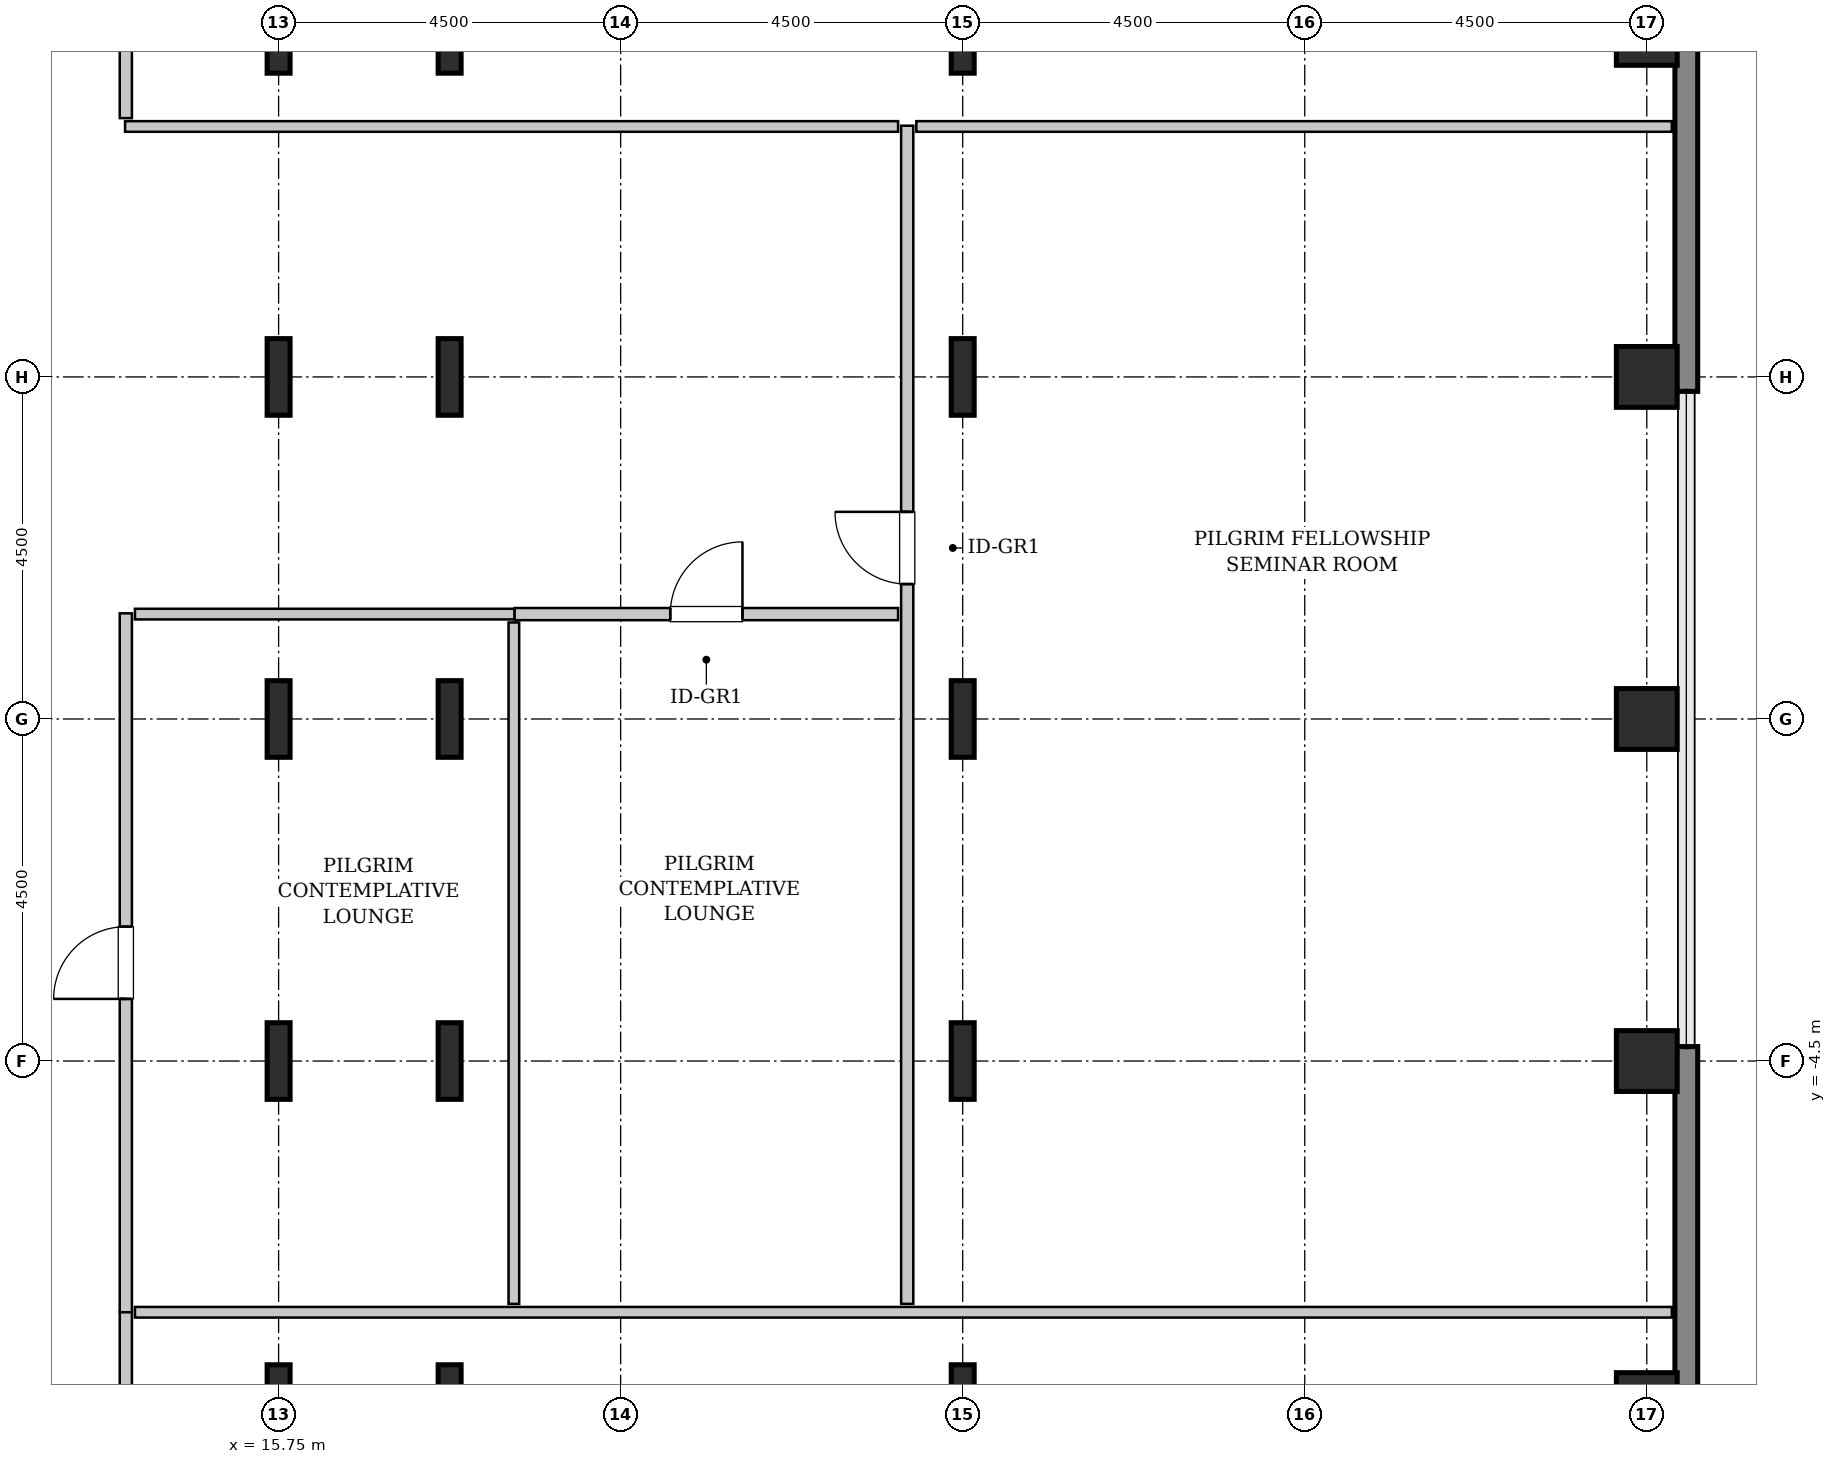
"""IFC4 building model, lengths in metres.
Left out: names, types, materials, properties, quantities, classifications, styles, units other than length and angle.
Written with IfcOpenShell. Run it as: python <this file> out.ifc"""

import sys

from ifc_helpers import new_model, si_unit, direction, frame, frame_2d, origin, origin_2d, place, context, subcontext, project, spatial, rectangle, hollow_rectangle, i_section, extrude, source, transform, mapped, element, fill, save


model = new_model("IFC4")
c1 = context("Model", 3, precision=1e-05, world=origin(), true_north=direction((0.0, 1.0)))
c2 = subcontext(c1, "Body", "Model", "MODEL_VIEW")
j1 = project(units=[si_unit("LENGTHUNIT", "METRE"), si_unit("PLANEANGLEUNIT", "RADIAN")], contexts=[c1])
p1 = place(None, origin())
s1 = spatial("IfcSite", under=j1, at=p1, CompositionType="ELEMENT")
p2 = place(p1, origin())
s2 = spatial("IfcBuilding", under=s1, at=p2, CompositionType="ELEMENT")
p3 = place(p2, frame((0.0, 0.0, 113.6)))
s3 = spatial("IfcBuildingStorey", under=s2, at=p3, CompositionType="ELEMENT", Elevation=113.6)
m1 = source(origin(), c2, "Body", "SweptSolid", [
    extrude(i_section(OverallWidth=0.302, OverallDepth=1.008, WebThickness=0.021, FlangeThickness=0.04, FilletRadius=0.03, at=origin_2d()), origin(), (0.0, 0.0, 1.0), 3.8),
])
for number, where, z_axis, x_axis in (
    (1, (15.75, -9.0, 0.0), (0.0, 0.0, 1.0), (1.0, 0.0, 0.0)),
    (2, (15.75, -4.5, 0.0), (0.0, 0.0, 1.0), (1.0, 0.0, 0.0)),
    (3, (15.75, 0.0, 0.0), (0.0, 0.0, 1.0), (1.0, 0.0, 0.0)),
    (4, (15.75, 4.5, 0.0), (0.0, 0.0, 1.0), (1.0, 0.0, 0.0)),
    (5, (15.75, 9.0, 0.0), (0.0, 0.0, 1.0), (1.0, 0.0, 0.0)),
    (6, (18.0, -9.0, 0.0), (0.0, 0.0, 1.0), (1.0, 0.0, 0.0)),
    (7, (18.0, -4.5, 0.0), (0.0, 0.0, 1.0), (1.0, 0.0, 0.0)),
    (8, (18.0, 0.0, 0.0), (0.0, 0.0, 1.0), (1.0, 0.0, 0.0)),
    (9, (18.0, 4.5, 0.0), (0.0, 0.0, 1.0), (1.0, 0.0, 0.0)),
    (10, (18.0, 9.0, 0.0), (0.0, 0.0, 1.0), (1.0, 0.0, 0.0)),
    (11, (24.75, -9.0, 0.0), (0.0, 0.0, 1.0), (1.0, 0.0, 0.0)),
    (12, (24.75, -4.5, 0.0), (0.0, 0.0, 1.0), (1.0, 0.0, 0.0)),
    (13, (24.75, 0.0, 0.0), (0.0, 0.0, 1.0), (1.0, 0.0, 0.0)),
    (14, (24.75, 4.5, 0.0), (0.0, 0.0, 1.0), (1.0, 0.0, 0.0)),
    (15, (24.75, 9.0, 0.0), (0.0, 0.0, 1.0), (1.0, 0.0, 0.0)),
):
    element("IfcColumn", number, at=place(p3, frame(where, z_axis=z_axis, x_axis=x_axis)), inside=s3, PredefinedType="COLUMN", context=c2, shape_type="MappedRepresentation", body=[
        mapped(m1, transform((0.0, 0.0, 0.0), x_axis=(1.0, 0.0, 0.0), y_axis=(0.0, 1.0, 0.0), z_axis=(0.0, 0.0, 1.0), scale=1.0)),
    ])
m2 = source(origin(), c2, "Body", "SweptSolid", [
    extrude(hollow_rectangle(XDim=0.8, YDim=0.8, WallThickness=0.04, InnerFilletRadius=0.04, OuterFilletRadius=0.08, at=origin_2d()), origin(), (0.0, 0.0, 1.0), 3.8),
])
for number, where, z_axis, x_axis in (
    (16, (33.75, -9.0, 0.0), (0.0, 0.0, 1.0), (1.0, 0.0, 0.0)),
    (17, (33.75, -4.5, 0.0), (0.0, 0.0, 1.0), (1.0, 0.0, 0.0)),
    (18, (33.75, 0.0, 0.0), (0.0, 0.0, 1.0), (1.0, 0.0, 0.0)),
    (19, (33.75, 4.5, 0.0), (0.0, 0.0, 1.0), (1.0, 0.0, 0.0)),
    (20, (33.75, 9.0, 0.0), (0.0, 0.0, 1.0), (1.0, 0.0, 0.0)),
):
    element("IfcColumn", number, at=place(p3, frame(where, z_axis=z_axis, x_axis=x_axis)), inside=s3, PredefinedType="COLUMN", context=c2, shape_type="MappedRepresentation", body=[
        mapped(m2, transform((0.0, 0.0, 0.0), x_axis=(1.0, 0.0, 0.0), y_axis=(0.0, 1.0, 0.0), z_axis=(0.0, 0.0, 1.0), scale=1.0)),
    ])
m3 = source(origin(), c2, "Body", "SweptSolid", [
    extrude(rectangle(XDim=4.88, YDim=0.3, at=frame_2d((2.44, 0.0))), origin(), (0.0, 0.0, 1.0), 3.55),
])
for number, where, z_axis, x_axis in (
    (21, (34.27, -9.19, 0.0), (0.0, 0.0, 1.0), (0.0, 1.0, 0.0)),
    (22, (34.27, 4.31, 0.0), (0.0, 0.0, 1.0), (0.0, 1.0, 0.0)),
):
    element("IfcWall", number, at=place(p3, frame(where, z_axis=z_axis, x_axis=x_axis)), inside=s3, PredefinedType="SHEAR", context=c2, shape_type="MappedRepresentation", body=[
        mapped(m3, transform((0.0, 0.0, 0.0), x_axis=(1.0, 0.0, 0.0), y_axis=(0.0, 1.0, 0.0), z_axis=(0.0, 0.0, 1.0), scale=1.0)),
    ])
m4 = source(origin(), c2, "Body", "SweptSolid", [
    extrude(rectangle(XDim=15.245, YDim=0.16, at=frame_2d((7.623, 0.0))), origin(), (0.0, 0.0, 1.0), 3.535),
])
p4 = place(p3, frame((13.74, -23.04, 0.0), z_axis=(0.0, 0.0, 1.0), x_axis=(0.0, 1.0, 0.0)))
e23 = element("IfcWall", 23, at=p4, inside=s3, PredefinedType="PARTITIONING", context=c2, shape_type="MappedRepresentation", body=[
    mapped(m4, transform((0.0, 0.0, 0.0), x_axis=(1.0, 0.0, 0.0), y_axis=(0.0, 1.0, 0.0), z_axis=(0.0, 0.0, 1.0), scale=1.0)),
])
p5 = place(p4, frame((12.913, 0.0, 0.0)))
e24 = element("IfcOpeningElement", 24, at=p5, cuts=e23, PredefinedType="OPENING", context=c2, shape_type="SweptSolid", body=[
    extrude(rectangle(XDim=0.95, YDim=2.1, at=frame_2d((0.475, 1.05))), frame((0.0, 0.09, 0.0), z_axis=(0.0, -1.0, 0.0), x_axis=(1.0, 0.0, 0.0)), (0.0, 0.0, 1.0), 0.18),
])
m5 = source(origin(), c2, "Body", "SweptSolid", [
    extrude(rectangle(XDim=20.22, YDim=0.14, at=frame_2d((10.11, 0.0))), origin(), (0.0, 0.0, 1.0), 3.535),
])
p6 = place(p3, frame((13.86, -7.805, 0.0), z_axis=(0.0, 0.0, 1.0), x_axis=(1.0, 0.0, 0.0)))
e25 = element("IfcWall", 25, at=p6, inside=s3, PredefinedType="PARTITIONING", context=c2, shape_type="MappedRepresentation", body=[
    mapped(m5, transform((0.0, 0.0, 0.0), x_axis=(1.0, 0.0, 0.0), y_axis=(0.0, 1.0, 0.0), z_axis=(0.0, 0.0, 1.0), scale=1.0)),
])
m6 = source(origin(), c2, "Body", "SweptSolid", [
    extrude(rectangle(XDim=15.5, YDim=0.16, at=frame_2d((7.75, 0.0))), origin(), (0.0, 0.0, 1.0), 3.535),
])
p7 = place(p3, frame((24.02, -7.695, 0.0), z_axis=(0.0, 0.0, 1.0), x_axis=(0.0, 1.0, 0.0)))
e26 = element("IfcWall", 26, at=p7, inside=s3, PredefinedType="PARTITIONING", context=c2, shape_type="MappedRepresentation", body=[
    mapped(m6, transform((0.0, 0.0, 0.0), x_axis=(1.0, 0.0, 0.0), y_axis=(0.0, 1.0, 0.0), z_axis=(0.0, 0.0, 1.0), scale=1.0)),
])
p8 = place(p7, frame((9.47, 0.0, 0.0)))
e27 = element("IfcOpeningElement", 27, at=p8, cuts=e26, PredefinedType="OPENING", context=c2, shape_type="SweptSolid", body=[
    extrude(rectangle(XDim=0.95, YDim=2.1, at=frame_2d((0.475, 1.05))), frame((0.0, 0.09, 0.0), z_axis=(0.0, -1.0, 0.0), x_axis=(1.0, 0.0, 0.0)), (0.0, 0.0, 1.0), 0.18),
])
m7 = source(origin(), c2, "Body", "SweptSolid", [
    extrude(rectangle(XDim=10.17, YDim=0.14, at=frame_2d((5.085, 0.0))), origin(), (0.0, 0.0, 1.0), 3.535),
])
p9 = place(p3, frame((13.73, 7.795, 0.0), z_axis=(0.0, 0.0, 1.0), x_axis=(1.0, 0.0, 0.0)))
e28 = element("IfcWall", 28, at=p9, inside=s3, PredefinedType="PARTITIONING", context=c2, shape_type="MappedRepresentation", body=[
    mapped(m7, transform((0.0, 0.0, 0.0), x_axis=(1.0, 0.0, 0.0), y_axis=(0.0, 1.0, 0.0), z_axis=(0.0, 0.0, 1.0), scale=1.0)),
])
m8 = source(origin(), c2, "Body", "SweptSolid", [
    extrude(rectangle(XDim=9.94, YDim=0.14, at=frame_2d((4.97, 0.0))), origin(), (0.0, 0.0, 1.0), 3.535),
])
p10 = place(p3, frame((24.14, 7.795, 0.0), z_axis=(0.0, 0.0, 1.0), x_axis=(1.0, 0.0, 0.0)))
e29 = element("IfcWall", 29, at=p10, inside=s3, PredefinedType="PARTITIONING", context=c2, shape_type="MappedRepresentation", body=[
    mapped(m8, transform((0.0, 0.0, 0.0), x_axis=(1.0, 0.0, 0.0), y_axis=(0.0, 1.0, 0.0), z_axis=(0.0, 0.0, 1.0), scale=1.0)),
])
m9 = source(origin(), c2, "Body", "SweptSolid", [
    extrude(rectangle(XDim=9.195, YDim=0.16, at=frame_2d((4.597, 0.0))), origin(), (0.0, 0.0, 1.0), 3.535),
])
p11 = place(p3, frame((13.74, -7.805, 0.0), z_axis=(0.0, 0.0, 1.0), x_axis=(0.0, 1.0, 0.0)))
e30 = element("IfcWall", 30, at=p11, inside=s3, PredefinedType="PARTITIONING", context=c2, shape_type="MappedRepresentation", body=[
    mapped(m9, transform((0.0, 0.0, 0.0), x_axis=(1.0, 0.0, 0.0), y_axis=(0.0, 1.0, 0.0), z_axis=(0.0, 0.0, 1.0), scale=1.0)),
])
p12 = place(p11, frame((4.123, 0.0, 0.0)))
e31 = element("IfcOpeningElement", 31, at=p12, cuts=e30, PredefinedType="OPENING", context=c2, shape_type="SweptSolid", body=[
    extrude(rectangle(XDim=0.95, YDim=2.1, at=frame_2d((0.475, 1.05))), frame((0.0, 0.09, 0.0), z_axis=(0.0, -1.0, 0.0), x_axis=(1.0, 0.0, 0.0)), (0.0, 0.0, 1.0), 0.18),
])
m10 = source(origin(), c2, "Body", "SweptSolid", [
    extrude(rectangle(XDim=4.995, YDim=0.14, at=frame_2d((2.498, 0.0))), origin(), (0.0, 0.0, 1.0), 3.535),
])
p13 = place(p3, frame((13.86, 1.38, 0.0), z_axis=(0.0, 0.0, 1.0), x_axis=(1.0, 0.0, 0.0)))
e32 = element("IfcWall", 32, at=p13, inside=s3, PredefinedType="PARTITIONING", context=c2, shape_type="MappedRepresentation", body=[
    mapped(m10, transform((0.0, 0.0, 0.0), x_axis=(1.0, 0.0, 0.0), y_axis=(0.0, 1.0, 0.0), z_axis=(0.0, 0.0, 1.0), scale=1.0)),
])
m11 = source(origin(), c2, "Body", "SweptSolid", [
    extrude(rectangle(XDim=8.965, YDim=0.14, at=frame_2d((4.482, 0.0))), origin(), (0.0, 0.0, 1.0), 3.535),
])
p14 = place(p3, frame((18.845, -7.695, 0.0), z_axis=(0.0, 0.0, 1.0), x_axis=(0.0, 1.0, 0.0)))
e33 = element("IfcWall", 33, at=p14, inside=s3, PredefinedType="PARTITIONING", context=c2, shape_type="MappedRepresentation", body=[
    mapped(m11, transform((0.0, 0.0, 0.0), x_axis=(1.0, 0.0, 0.0), y_axis=(0.0, 1.0, 0.0), z_axis=(0.0, 0.0, 1.0), scale=1.0)),
])
m12 = source(origin(), c2, "Body", "SweptSolid", [
    extrude(rectangle(XDim=5.045, YDim=0.16, at=frame_2d((2.522, 0.0))), origin(), (0.0, 0.0, 1.0), 3.535),
])
p15 = place(p3, frame((18.855, 1.38, 0.0), z_axis=(0.0, 0.0, 1.0), x_axis=(1.0, 0.0, 0.0)))
e34 = element("IfcWall", 34, at=p15, inside=s3, PredefinedType="PARTITIONING", context=c2, shape_type="MappedRepresentation", body=[
    mapped(m12, transform((0.0, 0.0, 0.0), x_axis=(1.0, 0.0, 0.0), y_axis=(0.0, 1.0, 0.0), z_axis=(0.0, 0.0, 1.0), scale=1.0)),
])
p16 = place(p15, frame((2.048, 0.0, 0.0)))
e35 = element("IfcOpeningElement", 35, at=p16, cuts=e34, PredefinedType="OPENING", context=c2, shape_type="SweptSolid", body=[
    extrude(rectangle(XDim=0.95, YDim=2.1, at=frame_2d((0.475, 1.05))), frame((0.0, 0.09, 0.0), z_axis=(0.0, -1.0, 0.0), x_axis=(1.0, 0.0, 0.0)), (0.0, 0.0, 1.0), 0.18),
])
m13 = source(origin(), c2, "Body", "SweptSolid", [
    extrude(rectangle(XDim=15.135, YDim=0.16, at=frame_2d((7.567, 0.0))), origin(), (0.0, 0.0, 1.0), 3.535),
])
p17 = place(p3, frame((13.74, 7.905, 0.0), z_axis=(0.0, 0.0, 1.0), x_axis=(0.0, 1.0, 0.0)))
e36 = element("IfcWall", 36, at=p17, inside=s3, PredefinedType="PARTITIONING", context=c2, shape_type="MappedRepresentation", body=[
    mapped(m13, transform((0.0, 0.0, 0.0), x_axis=(1.0, 0.0, 0.0), y_axis=(0.0, 1.0, 0.0), z_axis=(0.0, 0.0, 1.0), scale=1.0)),
])
p18 = place(p17, frame((1.327, 0.0, 0.0)))
e37 = element("IfcOpeningElement", 37, at=p18, cuts=e36, PredefinedType="OPENING", context=c2, shape_type="SweptSolid", body=[
    extrude(rectangle(XDim=0.95, YDim=2.1, at=frame_2d((0.475, 1.05))), frame((0.0, 0.09, 0.0), z_axis=(0.0, -1.0, 0.0), x_axis=(1.0, 0.0, 0.0)), (0.0, 0.0, 1.0), 0.18),
])
m14 = source(origin(), c2, "Body", "SweptSolid", [
    extrude(rectangle(XDim=0.95, YDim=2.1, at=frame_2d((0.475, 1.05))), frame((0.0, 0.025, 0.0), z_axis=(0.0, -1.0, 0.0), x_axis=(1.0, 0.0, 0.0)), (0.0, 0.0, 1.0), 0.05),
])
p19 = place(p8, origin())
e38 = element("IfcDoor", 38, at=p19, inside=s3, OperationType="SINGLE_SWING_RIGHT", PredefinedType="DOOR", context=c2, shape_type="MappedRepresentation", body=[
    mapped(m14, transform((0.0, 0.0, 0.0), x_axis=(1.0, 0.0, 0.0), y_axis=(0.0, 1.0, 0.0), z_axis=(0.0, 0.0, 1.0), scale=1.0)),
])
fill(e27, e38)
p20 = place(p12, origin())
e39 = element("IfcDoor", 39, at=p20, inside=s3, OperationType="SINGLE_SWING_LEFT", PredefinedType="DOOR", context=c2, shape_type="MappedRepresentation", body=[
    mapped(m14, transform((0.0, 0.0, 0.0), x_axis=(1.0, 0.0, 0.0), y_axis=(0.0, 1.0, 0.0), z_axis=(0.0, 0.0, 1.0), scale=1.0)),
])
fill(e31, e39)
p21 = place(p16, origin())
e40 = element("IfcDoor", 40, at=p21, inside=s3, OperationType="SINGLE_SWING_RIGHT", PredefinedType="DOOR", context=c2, shape_type="MappedRepresentation", body=[
    mapped(m14, transform((0.0, 0.0, 0.0), x_axis=(1.0, 0.0, 0.0), y_axis=(0.0, 1.0, 0.0), z_axis=(0.0, 0.0, 1.0), scale=1.0)),
])
fill(e35, e40)
save(model, sys.argv[1])
